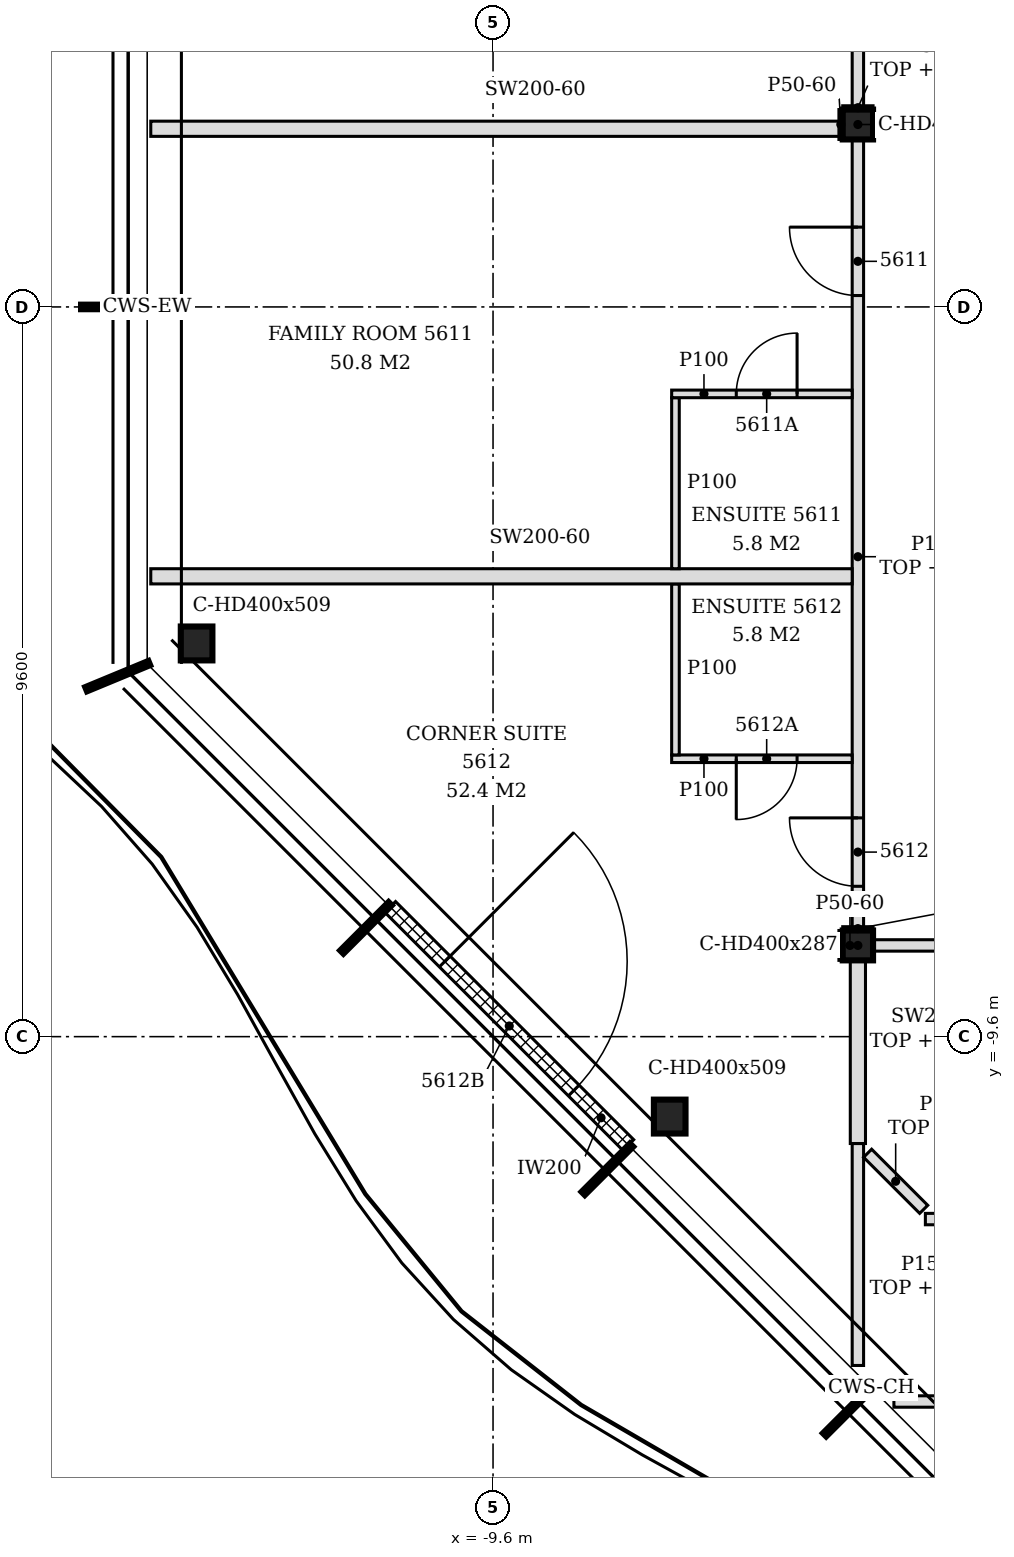
"""IFC4 building model, lengths in metres.
Left out: names, types, materials, properties, quantities, classifications, styles, units other than length and angle.
Written with IfcOpenShell. Run it as: python <this file> out.ifc"""

import sys

from ifc_helpers import new_model, si_unit, direction, frame, frame_2d, origin, origin_2d, place, context, subcontext, project, spatial, polyline, rectangle, i_section, outline, extrude, element, fill, save


model = new_model("IFC4")
c1 = context("Model", 3, precision=1e-05, world=origin(), true_north=direction((0.0, 1.0)))
c2 = subcontext(c1, "Body", "Model", "MODEL_VIEW")
j1 = project(units=[si_unit("LENGTHUNIT", "METRE"), si_unit("PLANEANGLEUNIT", "RADIAN")], contexts=[c1])
p1 = place(None, origin())
s1 = spatial("IfcSite", under=j1, at=p1, CompositionType="ELEMENT")
p2 = place(p1, origin())
s2 = spatial("IfcBuilding", under=s1, at=p2, CompositionType="ELEMENT")
p3 = place(p2, frame((0.0, 0.0, 221.4)))
s3 = spatial("IfcBuildingStorey", under=s2, at=p3, CompositionType="ELEMENT", Elevation=221.4)
for number, where, z_axis, x_axis in (
    (1, (-13.5, -4.427, -0.15), (0.0, 0.0, 1.0), (1.0, 0.0, 0.0)),
    (2, (-7.276, -10.652, -0.15), (0.0, 0.0, 1.0), (1.0, 0.0, 0.0)),
):
    element("IfcColumn", number, at=place(p3, frame(where, z_axis=z_axis, x_axis=x_axis)), inside=s3, PredefinedType="COLUMN", context=c2, shape_type="SweptSolid", body=[
        extrude(i_section(OverallWidth=0.416, OverallDepth=0.446, WebThickness=0.039, FlangeThickness=0.063, FilletRadius=0.015, at=origin_2d()), origin(), (0.0, 0.0, 1.0), 3.6),
    ])
for number, where, z_axis, x_axis in (
    (3, (-4.8, -8.4, -0.15), (0.0, 0.0, 1.0), (1.0, 0.0, 0.0)),
    (4, (-4.8, 2.4, -0.15), (0.0, 0.0, 1.0), (1.0, 0.0, 0.0)),
):
    element("IfcColumn", number, at=place(p3, frame(where, z_axis=z_axis, x_axis=x_axis)), inside=s3, PredefinedType="COLUMN", context=c2, shape_type="SweptSolid", body=[
        extrude(i_section(OverallWidth=0.399, OverallDepth=0.393, WebThickness=0.023, FlangeThickness=0.037, FilletRadius=0.015, at=origin_2d()), origin(), (0.0, 0.0, 1.0), 3.6),
    ])
p4 = place(p3, frame((-10.953, -7.893, 0.0), z_axis=(0.0, 0.0, 1.0), x_axis=(0.707106781187, -0.707106781187, 0.0)))
e5 = element("IfcWall", 5, at=p4, inside=s3, PredefinedType="NOTDEFINED", context=c2, shape_type="SweptSolid", body=[
    extrude(rectangle(XDim=4.431, YDim=0.2, at=frame_2d((2.215, 0.0))), origin(), (0.0, 0.0, 1.0), 3.45),
])
p5 = place(p4, frame((1.015, 0.0, 0.0)))
e6 = element("IfcOpeningElement", 6, at=p5, cuts=e5, PredefinedType="OPENING", context=c2, shape_type="SweptSolid", body=[
    extrude(rectangle(XDim=2.4, YDim=2.4, at=frame_2d((1.2, 1.2))), frame((0.0, 0.11, 0.0), z_axis=(0.0, -1.0, 0.0), x_axis=(1.0, 0.0, 0.0)), (0.0, 0.0, 1.0), 0.22),
])
p6 = place(p3, frame((-4.326, -14.4, 0.0), z_axis=(0.0, 0.0, 1.0), x_axis=(1.0, 0.0, 0.0)))
e7 = element("IfcWall", 7, at=p6, inside=s3, PredefinedType="PARTITIONING", context=c2, shape_type="SweptSolid", body=[
    extrude(outline(polyline([(0.0, 0.0), (21.026, 0.0), (21.026, 2.88), (11.676, 2.88), (11.674, 2.73), (11.376, 2.73), (11.374, 2.88), (1.369, 2.88), (1.367, 2.63), (0.229, 2.63), (0.227, 2.88), (0.0, 2.88), (0.0, 0.0)])), frame((0.0, 0.075, 0.0), z_axis=(0.0, -1.0, 0.0), x_axis=(1.0, 0.0, 0.0)), (0.0, 0.0, 1.0), 0.15),
])
p7 = place(p6, frame((5.169, 0.0, 0.0)))
e8 = element("IfcOpeningElement", 8, at=p7, cuts=e7, PredefinedType="OPENING", context=c2, shape_type="SweptSolid", body=[
    extrude(rectangle(XDim=0.9, YDim=2.1, at=frame_2d((0.45, 1.05))), frame((0.0, 0.085, 0.0), z_axis=(0.0, -1.0, 0.0), x_axis=(1.0, 0.0, 0.0)), (0.0, 0.0, 1.0), 0.17),
])
p8 = place(p6, frame((15.969, 0.0, 0.0)))
e9 = element("IfcOpeningElement", 9, at=p8, cuts=e7, PredefinedType="OPENING", context=c2, shape_type="SweptSolid", body=[
    extrude(rectangle(XDim=0.9, YDim=2.1, at=frame_2d((0.45, 1.05))), frame((0.0, 0.085, 0.0), z_axis=(0.0, -1.0, 0.0), x_axis=(1.0, 0.0, 0.0)), (0.0, 0.0, 1.0), 0.17),
])
p9 = place(p3, frame((-4.8, -13.926, 0.0), z_axis=(0.0, 0.0, 1.0), x_axis=(0.0, 1.0, 0.0)))
e10 = element("IfcWall", 10, at=p9, inside=s3, PredefinedType="PARTITIONING", context=c2, shape_type="SweptSolid", body=[
    extrude(outline(polyline([(0.0, 0.0), (2.92, 0.0), (2.92, 3.03), (1.369, 3.03), (1.367, 2.63), (0.229, 2.63), (0.227, 3.03), (0.0, 3.03), (0.0, 0.0)])), frame((0.0, 0.075, 0.0), z_axis=(0.0, -1.0, 0.0), x_axis=(1.0, 0.0, 0.0)), (0.0, 0.0, 1.0), 0.15),
])
p10 = place(p3, frame((-3.912, -12.0, 0.0), z_axis=(0.0, 0.0, 1.0), x_axis=(1.0, 0.0, 0.0)))
e11 = element("IfcWall", 11, at=p10, inside=s3, PredefinedType="PARTITIONING", context=c2, shape_type="SweptSolid", body=[
    extrude(rectangle(XDim=8.787, YDim=0.15, at=frame_2d((4.394, 0.0))), origin(), (0.0, 0.0, 1.0), 3.45),
])
p11 = place(p3, frame((-3.934, -11.872, 0.0), z_axis=(0.0, 0.0, 1.0), x_axis=(-0.707106781187, 0.707106781187, 0.0)))
e12 = element("IfcWall", 12, at=p11, inside=s3, PredefinedType="PARTITIONING", context=c2, shape_type="SweptSolid", body=[
    extrude(rectangle(XDim=1.044, YDim=0.15, at=frame_2d((0.522, 0.0))), origin(), (0.0, 0.0, 1.0), 3.03),
])
p12 = place(p3, frame((-4.8, -11.006, 0.0), z_axis=(0.0, 0.0, 1.0), x_axis=(0.0, 1.0, 0.0)))
e13 = element("IfcWall", 13, at=p12, inside=s3, PredefinedType="PARTITIONING", context=c2, shape_type="SweptSolid", body=[
    extrude(rectangle(XDim=2.41, YDim=0.2, at=frame_2d((1.205, 0.0))), origin(), (0.0, 0.0, 1.0), 3.03),
])
p13 = place(p3, frame((-4.601, -8.4, 0.0), z_axis=(0.0, 0.0, 1.0), x_axis=(1.0, 0.0, 0.0)))
e14 = element("IfcWall", 14, at=p13, inside=s3, PredefinedType="PARTITIONING", context=c2, shape_type="SweptSolid", body=[
    extrude(rectangle(XDim=9.476, YDim=0.15, at=frame_2d((4.738, 0.0))), origin(), (0.0, 0.0, 1.0), 2.83),
])
p14 = place(p13, frame((4.15, 0.0, 0.0)))
e15 = element("IfcOpeningElement", 15, at=p14, cuts=e14, PredefinedType="OPENING", context=c2, shape_type="SweptSolid", body=[
    extrude(rectangle(XDim=0.9, YDim=2.1, at=frame_2d((0.45, 1.05))), frame((0.0, 0.085, 0.0), z_axis=(0.0, -1.0, 0.0), x_axis=(1.0, 0.0, 0.0)), (0.0, 0.0, 1.0), 0.17),
])
p15 = place(p3, frame((-4.8, -8.204, 0.0), z_axis=(0.0, 0.0, 1.0), x_axis=(0.0, 1.0, 0.0)))
e16 = element("IfcWall", 16, at=p15, inside=s3, PredefinedType="PARTITIONING", context=c2, shape_type="SweptSolid", body=[
    extrude(rectangle(XDim=10.407, YDim=0.15, at=frame_2d((5.204, 0.0))), origin(), (0.0, 0.0, 1.0), 2.83),
])
p16 = place(p15, frame((8.354, 0.0, 0.0)))
e17 = element("IfcOpeningElement", 17, at=p16, cuts=e16, PredefinedType="OPENING", context=c2, shape_type="SweptSolid", body=[
    extrude(rectangle(XDim=0.9, YDim=2.1, at=frame_2d((0.45, 1.05))), frame((0.0, 0.085, 0.0), z_axis=(0.0, -1.0, 0.0), x_axis=(1.0, 0.0, 0.0)), (0.0, 0.0, 1.0), 0.17),
])
p17 = place(p15, frame((0.582, 0.0, 0.0)))
e18 = element("IfcOpeningElement", 18, at=p17, cuts=e16, PredefinedType="OPENING", context=c2, shape_type="SweptSolid", body=[
    extrude(rectangle(XDim=0.9, YDim=2.1, at=frame_2d((0.45, 1.05))), frame((0.0, 0.085, 0.0), z_axis=(0.0, -1.0, 0.0), x_axis=(1.0, 0.0, 0.0)), (0.0, 0.0, 1.0), 0.17),
])
p18 = place(p3, frame((-7.25, -5.944, 0.0), z_axis=(0.0, 0.0, 1.0), x_axis=(1.0, 0.0, 0.0)))
e19 = element("IfcWall", 19, at=p18, inside=s3, PredefinedType="PARTITIONING", context=c2, shape_type="SweptSolid", body=[
    extrude(outline(polyline([(0.0, 0.0), (2.375, 0.0), (2.375, 2.83), (2.3, 2.83), (2.298, 3.45), (0.0, 3.45), (0.0, 0.0)])), frame((0.0, 0.05, 0.0), z_axis=(0.0, -1.0, 0.0), x_axis=(1.0, 0.0, 0.0)), (0.0, 0.0, 1.0), 0.1),
])
p19 = place(p18, frame((0.85, 0.0, 0.0)))
e20 = element("IfcOpeningElement", 20, at=p19, cuts=e19, PredefinedType="OPENING", context=c2, shape_type="SweptSolid", body=[
    extrude(rectangle(XDim=0.8, YDim=2.1, at=frame_2d((0.4, 1.05))), frame((0.0, 0.06, 0.0), z_axis=(0.0, -1.0, 0.0), x_axis=(1.0, 0.0, 0.0)), (0.0, 0.0, 1.0), 0.12),
])
p20 = place(p3, frame((-7.2, -5.894, 0.0), z_axis=(0.0, 0.0, 1.0), x_axis=(0.0, 1.0, 0.0)))
e21 = element("IfcWall", 21, at=p20, inside=s3, PredefinedType="PARTITIONING", context=c2, shape_type="SweptSolid", body=[
    extrude(outline(polyline([(0.0, 0.0), (2.25, 0.0), (2.25, 3.45), (1.189, 3.45), (1.187, 2.98), (0.999, 2.98), (0.997, 3.45), (0.0, 3.45), (0.0, 0.0)])), frame((0.0, 0.05, 0.0), z_axis=(0.0, -1.0, 0.0), x_axis=(1.0, 0.0, 0.0)), (0.0, 0.0, 1.0), 0.1),
])
p21 = place(p3, frame((-14.103, -3.544, 0.0), z_axis=(0.0, 0.0, 1.0), x_axis=(1.0, 0.0, 0.0)))
e22 = element("IfcWall", 22, at=p21, inside=s3, PredefinedType="PARTITIONING", context=c2, shape_type="SweptSolid", body=[
    extrude(outline(polyline([(0.0, 0.0), (9.228, 0.0), (9.228, 2.83), (9.153, 2.83), (9.151, 3.45), (0.753, 3.45), (0.751, 2.93), (0.453, 2.93), (0.451, 3.45), (0.0, 3.45), (0.0, 0.0)])), frame((0.0, 0.1, 0.0), z_axis=(0.0, -1.0, 0.0), x_axis=(1.0, 0.0, 0.0)), (0.0, 0.0, 1.0), 0.2),
])
p22 = place(p3, frame((-7.2, -3.444, 0.0), z_axis=(0.0, 0.0, 1.0), x_axis=(0.0, 1.0, 0.0)))
e23 = element("IfcWall", 23, at=p22, inside=s3, PredefinedType="PARTITIONING", context=c2, shape_type="SweptSolid", body=[
    extrude(rectangle(XDim=2.25, YDim=0.1, at=frame_2d((1.125, 0.0))), origin(), (0.0, 0.0, 1.0), 3.45),
])
p23 = place(p3, frame((-7.25, -1.144, 0.0), z_axis=(0.0, 0.0, 1.0), x_axis=(1.0, 0.0, 0.0)))
e24 = element("IfcWall", 24, at=p23, inside=s3, PredefinedType="PARTITIONING", context=c2, shape_type="SweptSolid", body=[
    extrude(outline(polyline([(0.0, 0.0), (2.375, 0.0), (2.375, 2.83), (2.3, 2.83), (2.298, 3.45), (0.0, 3.45), (0.0, 0.0)])), frame((0.0, 0.05, 0.0), z_axis=(0.0, -1.0, 0.0), x_axis=(1.0, 0.0, 0.0)), (0.0, 0.0, 1.0), 0.1),
])
p24 = place(p23, frame((0.85, 0.0, 0.0)))
e25 = element("IfcOpeningElement", 25, at=p24, cuts=e24, PredefinedType="OPENING", context=c2, shape_type="SweptSolid", body=[
    extrude(rectangle(XDim=0.8, YDim=2.1, at=frame_2d((0.4, 1.05))), frame((0.0, 0.06, 0.0), z_axis=(0.0, -1.0, 0.0), x_axis=(1.0, 0.0, 0.0)), (0.0, 0.0, 1.0), 0.12),
])
p25 = place(p3, frame((-14.103, 2.344, 0.0), z_axis=(0.0, 0.0, 1.0), x_axis=(1.0, 0.0, 0.0)))
e26 = element("IfcWall", 26, at=p25, inside=s3, PredefinedType="PARTITIONING", context=c2, shape_type="SweptSolid", body=[
    extrude(outline(polyline([(0.0, 0.0), (9.104, 0.0), (9.104, 3.45), (0.753, 3.45), (0.751, 2.93), (0.453, 2.93), (0.451, 3.45), (0.0, 3.45), (0.0, 0.0)])), frame((0.0, 0.1, 0.0), z_axis=(0.0, -1.0, 0.0), x_axis=(1.0, 0.0, 0.0)), (0.0, 0.0, 1.0), 0.2),
])
p26 = place(p3, frame((-4.8, 2.596, 0.0), z_axis=(0.0, 0.0, 1.0), x_axis=(0.0, 1.0, 0.0)))
e27 = element("IfcWall", 27, at=p26, inside=s3, PredefinedType="PARTITIONING", context=c2, shape_type="SweptSolid", body=[
    extrude(outline(polyline([(0.0, 0.0), (10.407, 0.0), (10.407, 2.63), (9.961, 2.63), (9.959, 2.83), (0.0, 2.83), (0.0, 0.0)])), frame((0.0, 0.075, 0.0), z_axis=(0.0, -1.0, 0.0), x_axis=(1.0, 0.0, 0.0)), (0.0, 0.0, 1.0), 0.15),
])
for number, where, z_axis, x_axis in (
    (28, (-5.024, -8.596, 0.0), (0.0, 0.0, 1.0), (0.0, 1.0, 0.0)),
    (29, (-5.024, 2.204, 0.0), (0.0, 0.0, 1.0), (0.0, 1.0, 0.0)),
):
    element("IfcWall", number, at=place(p3, frame(where, z_axis=z_axis, x_axis=x_axis)), inside=s3, PredefinedType="PARTITIONING", context=c2, shape_type="SweptSolid", body=[
        extrude(rectangle(XDim=0.393, YDim=0.05, at=frame_2d((0.196, 0.0))), origin(), (0.0, 0.0, 1.0), 3.45),
    ])
for number, where, z_axis, x_axis in (
    (30, (-5.0, -8.178, 0.0), (0.0, 0.0, 1.0), (1.0, 0.0, 0.0)),
    (31, (-5.0, 2.622, 0.0), (0.0, 0.0, 1.0), (1.0, 0.0, 0.0)),
):
    element("IfcWall", number, at=place(p3, frame(where, z_axis=z_axis, x_axis=x_axis)), inside=s3, PredefinedType="PARTITIONING", context=c2, shape_type="SweptSolid", body=[
        extrude(rectangle(XDim=0.399, YDim=0.05, at=frame_2d((0.199, 0.0))), origin(), (0.0, 0.0, 1.0), 2.83),
    ])
p27 = place(p5, origin())
e32 = element("IfcDoor", 32, at=p27, inside=s3, OperationType="SINGLE_SWING_LEFT", PredefinedType="DOOR", context=c2, shape_type="SweptSolid", body=[
    extrude(rectangle(XDim=2.4, YDim=2.4, at=frame_2d((1.2, 1.2))), frame((0.0, 0.025, 0.0), z_axis=(0.0, -1.0, 0.0), x_axis=(1.0, 0.0, 0.0)), (0.0, 0.0, 1.0), 0.05),
])
fill(e6, e32)
p28 = place(p16, origin())
e33 = element("IfcDoor", 33, at=p28, inside=s3, OperationType="SINGLE_SWING_RIGHT", PredefinedType="DOOR", context=c2, shape_type="SweptSolid", body=[
    extrude(rectangle(XDim=0.9, YDim=2.1, at=frame_2d((0.45, 1.05))), frame((0.0, 0.025, 0.0), z_axis=(0.0, -1.0, 0.0), x_axis=(1.0, 0.0, 0.0)), (0.0, 0.0, 1.0), 0.05),
])
fill(e17, e33)
p29 = place(p24, origin())
e34 = element("IfcDoor", 34, at=p29, inside=s3, OperationType="SINGLE_SWING_RIGHT", PredefinedType="DOOR", context=c2, shape_type="SweptSolid", body=[
    extrude(rectangle(XDim=0.8, YDim=2.1, at=frame_2d((0.4, 1.05))), frame((0.0, 0.025, 0.0), z_axis=(0.0, -1.0, 0.0), x_axis=(1.0, 0.0, 0.0)), (0.0, 0.0, 1.0), 0.05),
])
fill(e25, e34)
p30 = place(p17, origin())
e35 = element("IfcDoor", 35, at=p30, inside=s3, OperationType="SINGLE_SWING_RIGHT", PredefinedType="DOOR", context=c2, shape_type="SweptSolid", body=[
    extrude(rectangle(XDim=0.9, YDim=2.1, at=frame_2d((0.45, 1.05))), frame((0.0, 0.025, 0.0), z_axis=(0.0, -1.0, 0.0), x_axis=(1.0, 0.0, 0.0)), (0.0, 0.0, 1.0), 0.05),
])
fill(e18, e35)
p31 = place(p19, frame((0.8, 0.0, 0.0), z_axis=(0.0, 0.0, 1.0), x_axis=(-1.0, 0.0, 0.0)))
e36 = element("IfcDoor", 36, at=p31, inside=s3, OperationType="SINGLE_SWING_RIGHT", PredefinedType="DOOR", context=c2, shape_type="SweptSolid", body=[
    extrude(rectangle(XDim=0.8, YDim=2.1, at=frame_2d((0.4, 1.05))), frame((0.0, 0.025, 0.0), z_axis=(0.0, -1.0, 0.0), x_axis=(1.0, 0.0, 0.0)), (0.0, 0.0, 1.0), 0.05),
])
fill(e20, e36)
save(model, sys.argv[1])
